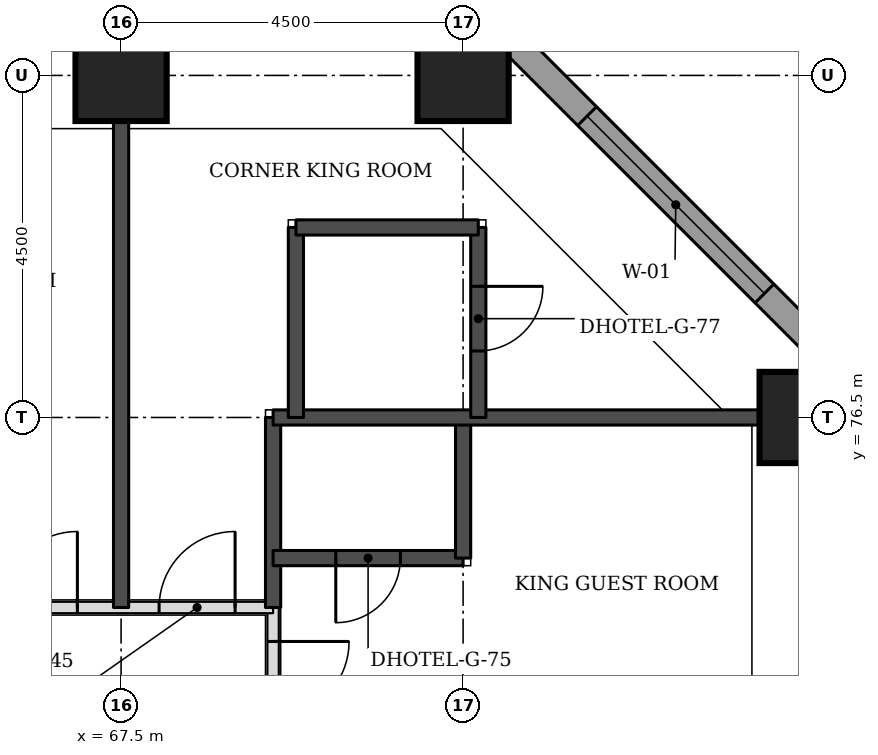
"""IFC4 building model, lengths in metres.
Left out: names, types, materials, properties, quantities, classifications, styles, units other than length and angle.
Written with IfcOpenShell. Run it as: python <this file> out.ifc"""

import sys

from ifc_helpers import new_model, si_unit, direction, frame, frame_2d, origin, origin_2d, place, context, subcontext, project, spatial, rectangle, extrude, element, fill, save


model = new_model("IFC4")
c1 = context("Model", 3, precision=1e-05, world=origin(), true_north=direction((0.0, 1.0)))
c2 = subcontext(c1, "Body", "Model", "MODEL_VIEW")
j1 = project(units=[si_unit("LENGTHUNIT", "METRE"), si_unit("PLANEANGLEUNIT", "RADIAN")], contexts=[c1])
p1 = place(None, origin())
s1 = spatial("IfcSite", under=j1, at=p1, CompositionType="ELEMENT")
p2 = place(p1, origin())
s2 = spatial("IfcBuilding", under=s1, at=p2, CompositionType="ELEMENT")
p3 = place(p2, frame((0.0, 0.0, 66.0)))
s3 = spatial("IfcBuildingStorey", under=s2, at=p3, CompositionType="ELEMENT", Elevation=66.0)
for number, where, z_axis, x_axis in (
    (1, (76.5, 76.5, 0.0), (0.0, 0.0, 1.0), (1.0, 0.0, 0.0)),
    (2, (67.5, 81.0, 0.0), (0.0, 0.0, 1.0), (1.0, 0.0, 0.0)),
    (3, (72.0, 81.0, 0.0), (0.0, 0.0, 1.0), (1.0, 0.0, 0.0)),
):
    element("IfcColumn", number, at=place(p3, frame(where, z_axis=z_axis, x_axis=x_axis)), inside=s3, PredefinedType="COLUMN", context=c2, shape_type="SweptSolid", body=[
        extrude(rectangle(XDim=1.2, YDim=1.2, at=origin_2d()), origin(), (0.0, 0.0, 1.0), 3.3),
    ])
p4 = place(p3, frame((77.326, 76.77, 0.0), z_axis=(0.0, 0.0, 1.0), x_axis=(-0.707106781187, 0.707106781187, 0.0)))
e4 = element("IfcWall", 4, at=p4, inside=s3, PredefinedType="STANDARD", context=c2, shape_type="SweptSolid", body=[
    extrude(rectangle(XDim=7.151, YDim=0.35, at=frame_2d((3.576, 0.0))), origin(), (0.0, 0.0, 1.0), 3.055),
])
p5 = place(p4, frame((1.926, 0.0, 0.8)))
e5 = element("IfcOpeningElement", 5, at=p5, cuts=e4, PredefinedType="OPENING", context=c2, shape_type="SweptSolid", body=[
    extrude(rectangle(XDim=3.3, YDim=1.5, at=frame_2d((1.65, 0.75))), frame((0.0, 0.185, 0.0), z_axis=(0.0, -1.0, 0.0), x_axis=(1.0, 0.0, 0.0)), (0.0, 0.0, 1.0), 0.37),
])
p6 = place(p3, frame((69.5, 47.5, 0.0), z_axis=(0.0, 0.0, 1.0), x_axis=(0.0, 1.0, 0.0)))
e6 = element("IfcWall", 6, at=p6, inside=s3, PredefinedType="PARTITIONING", context=c2, shape_type="SweptSolid", body=[
    extrude(rectangle(XDim=26.5, YDim=0.15, at=frame_2d((13.25, 0.0))), origin(), (0.0, 0.0, 1.0), 3.08),
])
p7 = place(p6, frame((25.053, 0.0, 0.0)))
e7 = element("IfcOpeningElement", 7, at=p7, cuts=e6, PredefinedType="OPENING", context=c2, shape_type="SweptSolid", body=[
    extrude(rectangle(XDim=1.0, YDim=2.1, at=frame_2d((0.5, 1.05))), frame((0.0, 0.085, 0.0), z_axis=(0.0, -1.0, 0.0), x_axis=(1.0, 0.0, 0.0)), (0.0, 0.0, 1.0), 0.17),
])
p8 = place(p6, frame((22.925, 0.0, 0.0)))
e8 = element("IfcOpeningElement", 8, at=p8, cuts=e6, PredefinedType="OPENING", context=c2, shape_type="SweptSolid", body=[
    extrude(rectangle(XDim=1.0, YDim=2.1, at=frame_2d((0.5, 1.05))), frame((0.0, 0.085, 0.0), z_axis=(0.0, -1.0, 0.0), x_axis=(1.0, 0.0, 0.0)), (0.0, 0.0, 1.0), 0.17),
])
p9 = place(p6, frame((16.325, 0.0, 0.0)))
e9 = element("IfcOpeningElement", 9, at=p9, cuts=e6, PredefinedType="OPENING", context=c2, shape_type="SweptSolid", body=[
    extrude(rectangle(XDim=1.0, YDim=2.1, at=frame_2d((0.5, 1.05))), frame((0.0, 0.085, 0.0), z_axis=(0.0, -1.0, 0.0), x_axis=(1.0, 0.0, 0.0)), (0.0, 0.0, 1.0), 0.17),
])
p10 = place(p6, frame((13.925, 0.0, 0.0)))
e10 = element("IfcOpeningElement", 10, at=p10, cuts=e6, PredefinedType="OPENING", context=c2, shape_type="SweptSolid", body=[
    extrude(rectangle(XDim=1.0, YDim=2.1, at=frame_2d((0.5, 1.05))), frame((0.0, 0.085, 0.0), z_axis=(0.0, -1.0, 0.0), x_axis=(1.0, 0.0, 0.0)), (0.0, 0.0, 1.0), 0.17),
])
p11 = place(p6, frame((4.25, 0.0, 0.0)))
e11 = element("IfcOpeningElement", 11, at=p11, cuts=e6, PredefinedType="OPENING", context=c2, shape_type="SweptSolid", body=[
    extrude(rectangle(XDim=1.1, YDim=2.1, at=frame_2d((0.55, 1.05))), frame((0.0, 0.085, 0.0), z_axis=(0.0, -1.0, 0.0), x_axis=(1.0, 0.0, 0.0)), (0.0, 0.0, 1.0), 0.17),
])
p12 = place(p6, frame((0.447, 0.0, 0.0)))
e12 = element("IfcOpeningElement", 12, at=p12, cuts=e6, PredefinedType="OPENING", context=c2, shape_type="SweptSolid", body=[
    extrude(rectangle(XDim=1.0, YDim=2.1, at=frame_2d((0.5, 1.05))), frame((0.0, 0.085, 0.0), z_axis=(0.0, -1.0, 0.0), x_axis=(1.0, 0.0, 0.0)), (0.0, 0.0, 1.0), 0.17),
])
p13 = place(p3, frame((43.0, 74.0, 0.0), z_axis=(0.0, 0.0, 1.0), x_axis=(1.0, 0.0, 0.0)))
e13 = element("IfcWall", 13, at=p13, inside=s3, PredefinedType="PARTITIONING", context=c2, shape_type="SweptSolid", body=[
    extrude(rectangle(XDim=26.5, YDim=0.15, at=frame_2d((13.25, 0.0))), origin(), (0.0, 0.0, 1.0), 3.08),
])
p14 = place(p13, frame((4.925, 0.0, 0.0)))
e14 = element("IfcOpeningElement", 14, at=p14, cuts=e13, PredefinedType="OPENING", context=c2, shape_type="SweptSolid", body=[
    extrude(rectangle(XDim=1.0, YDim=2.1, at=frame_2d((0.5, 1.05))), frame((0.0, 0.085, 0.0), z_axis=(0.0, -1.0, 0.0), x_axis=(1.0, 0.0, 0.0)), (0.0, 0.0, 1.0), 0.17),
])
p15 = place(p13, frame((7.325, 0.0, 0.0)))
e15 = element("IfcOpeningElement", 15, at=p15, cuts=e13, PredefinedType="OPENING", context=c2, shape_type="SweptSolid", body=[
    extrude(rectangle(XDim=1.0, YDim=2.1, at=frame_2d((0.5, 1.05))), frame((0.0, 0.085, 0.0), z_axis=(0.0, -1.0, 0.0), x_axis=(1.0, 0.0, 0.0)), (0.0, 0.0, 1.0), 0.17),
])
p16 = place(p13, frame((13.925, 0.0, 0.0)))
e16 = element("IfcOpeningElement", 16, at=p16, cuts=e13, PredefinedType="OPENING", context=c2, shape_type="SweptSolid", body=[
    extrude(rectangle(XDim=1.0, YDim=2.1, at=frame_2d((0.5, 1.05))), frame((0.0, 0.085, 0.0), z_axis=(0.0, -1.0, 0.0), x_axis=(1.0, 0.0, 0.0)), (0.0, 0.0, 1.0), 0.17),
])
p17 = place(p13, frame((16.325, 0.0, 0.0)))
e17 = element("IfcOpeningElement", 17, at=p17, cuts=e13, PredefinedType="OPENING", context=c2, shape_type="SweptSolid", body=[
    extrude(rectangle(XDim=1.0, YDim=2.1, at=frame_2d((0.5, 1.05))), frame((0.0, 0.085, 0.0), z_axis=(0.0, -1.0, 0.0), x_axis=(1.0, 0.0, 0.0)), (0.0, 0.0, 1.0), 0.17),
])
p18 = place(p13, frame((22.925, 0.0, 0.0)))
e18 = element("IfcOpeningElement", 18, at=p18, cuts=e13, PredefinedType="OPENING", context=c2, shape_type="SweptSolid", body=[
    extrude(rectangle(XDim=1.0, YDim=2.1, at=frame_2d((0.5, 1.05))), frame((0.0, 0.085, 0.0), z_axis=(0.0, -1.0, 0.0), x_axis=(1.0, 0.0, 0.0)), (0.0, 0.0, 1.0), 0.17),
])
p19 = place(p13, frame((0.5, 0.0, 0.0)))
e19 = element("IfcOpeningElement", 19, at=p19, cuts=e13, PredefinedType="OPENING", context=c2, shape_type="SweptSolid", body=[
    extrude(rectangle(XDim=1.0, YDim=2.1, at=frame_2d((0.5, 1.05))), frame((0.0, 0.085, 0.0), z_axis=(0.0, -1.0, 0.0), x_axis=(1.0, 0.0, 0.0)), (0.0, 0.0, 1.0), 0.17),
])
p20 = place(p13, frame((25.0, 0.0, 0.0)))
e20 = element("IfcOpeningElement", 20, at=p20, cuts=e13, PredefinedType="OPENING", context=c2, shape_type="SweptSolid", body=[
    extrude(rectangle(XDim=1.0, YDim=2.1, at=frame_2d((0.5, 1.05))), frame((0.0, 0.085, 0.0), z_axis=(0.0, -1.0, 0.0), x_axis=(1.0, 0.0, 0.0)), (0.0, 0.0, 1.0), 0.17),
])
p21 = place(p3, frame((67.5, 74.0, 0.0), z_axis=(0.0, 0.0, 1.0), x_axis=(0.0, 1.0, 0.0)))
e21 = element("IfcWall", 21, at=p21, inside=s3, PredefinedType="SOLIDWALL", context=c2, shape_type="SweptSolid", body=[
    extrude(rectangle(XDim=6.4, YDim=0.2, at=frame_2d((3.2, 0.0))), origin(), (0.0, 0.0, 1.0), 3.08),
])
p22 = place(p3, frame((69.5, 74.0, 0.0), z_axis=(0.0, 0.0, 1.0), x_axis=(0.0, 1.0, 0.0)))
e22 = element("IfcWall", 22, at=p22, inside=s3, PredefinedType="SOLIDWALL", context=c2, shape_type="SweptSolid", body=[
    extrude(rectangle(XDim=2.5, YDim=0.2, at=frame_2d((1.25, 0.0))), origin(), (0.0, 0.0, 1.0), 3.08),
])
p23 = place(p3, frame((69.5, 74.65, 0.0), z_axis=(0.0, 0.0, 1.0), x_axis=(1.0, 0.0, 0.0)))
e23 = element("IfcWall", 23, at=p23, inside=s3, PredefinedType="SOLIDWALL", context=c2, shape_type="SweptSolid", body=[
    extrude(rectangle(XDim=2.5, YDim=0.2, at=frame_2d((1.25, 0.0))), origin(), (0.0, 0.0, 1.0), 3.08),
])
p24 = place(p23, frame((0.825, 0.0, 0.0)))
e24 = element("IfcOpeningElement", 24, at=p24, cuts=e23, PredefinedType="OPENING", context=c2, shape_type="SweptSolid", body=[
    extrude(rectangle(XDim=0.85, YDim=2.1, at=frame_2d((0.425, 1.05))), frame((0.0, 0.11, 0.0), z_axis=(0.0, -1.0, 0.0), x_axis=(1.0, 0.0, 0.0)), (0.0, 0.0, 1.0), 0.22),
])
p25 = place(p3, frame((72.0, 74.65, 0.0), z_axis=(0.0, 0.0, 1.0), x_axis=(0.0, 1.0, 0.0)))
e25 = element("IfcWall", 25, at=p25, inside=s3, PredefinedType="SOLIDWALL", context=c2, shape_type="SweptSolid", body=[
    extrude(rectangle(XDim=1.85, YDim=0.2, at=frame_2d((0.925, 0.0))), origin(), (0.0, 0.0, 1.0), 3.08),
])
p26 = place(p3, frame((69.5, 76.5, 0.0), z_axis=(0.0, 0.0, 1.0), x_axis=(1.0, 0.0, 0.0)))
e26 = element("IfcWall", 26, at=p26, inside=s3, PredefinedType="SOLIDWALL", context=c2, shape_type="SweptSolid", body=[
    extrude(rectangle(XDim=6.4, YDim=0.2, at=frame_2d((3.2, 0.0))), origin(), (0.0, 0.0, 1.0), 3.08),
])
p27 = place(p3, frame((69.8, 76.5, 0.0), z_axis=(0.0, 0.0, 1.0), x_axis=(0.0, 1.0, 0.0)))
e27 = element("IfcWall", 27, at=p27, inside=s3, PredefinedType="SOLIDWALL", context=c2, shape_type="SweptSolid", body=[
    extrude(rectangle(XDim=2.5, YDim=0.2, at=frame_2d((1.25, 0.0))), origin(), (0.0, 0.0, 1.0), 3.08),
])
p28 = place(p3, frame((72.2, 76.5, 0.0), z_axis=(0.0, 0.0, 1.0), x_axis=(0.0, 1.0, 0.0)))
e28 = element("IfcWall", 28, at=p28, inside=s3, PredefinedType="SOLIDWALL", context=c2, shape_type="SweptSolid", body=[
    extrude(rectangle(XDim=2.5, YDim=0.2, at=frame_2d((1.25, 0.0))), origin(), (0.0, 0.0, 1.0), 3.08),
])
p29 = place(p28, frame((0.875, 0.0, 0.0)))
e29 = element("IfcOpeningElement", 29, at=p29, cuts=e28, PredefinedType="OPENING", context=c2, shape_type="SweptSolid", body=[
    extrude(rectangle(XDim=0.85, YDim=2.1, at=frame_2d((0.425, 1.05))), frame((0.0, 0.11, 0.0), z_axis=(0.0, -1.0, 0.0), x_axis=(1.0, 0.0, 0.0)), (0.0, 0.0, 1.0), 0.22),
])
p30 = place(p3, frame((69.8, 79.0, 0.0), z_axis=(0.0, 0.0, 1.0), x_axis=(1.0, 0.0, 0.0)))
e30 = element("IfcWall", 30, at=p30, inside=s3, PredefinedType="SOLIDWALL", context=c2, shape_type="SweptSolid", body=[
    extrude(rectangle(XDim=2.4, YDim=0.2, at=frame_2d((1.2, 0.0))), origin(), (0.0, 0.0, 1.0), 3.08),
])
p31 = place(p5, origin())
e31 = element("IfcWindow", 31, at=p31, inside=s3, PartitioningType="SINGLE_PANEL", PredefinedType="WINDOW", context=c2, shape_type="SweptSolid", body=[
    extrude(rectangle(XDim=3.3, YDim=1.5, at=frame_2d((1.65, 0.75))), frame((0.0, 0.085, 0.0), z_axis=(0.0, -1.0, 0.0), x_axis=(1.0, 0.0, 0.0)), (0.0, 0.0, 1.0), 0.06),
])
fill(e5, e31)
p32 = place(p18, origin())
e32 = element("IfcDoor", 32, at=p32, inside=s3, OperationType="SINGLE_SWING_RIGHT", PredefinedType="DOOR", context=c2, shape_type="SweptSolid", body=[
    extrude(rectangle(XDim=1.0, YDim=2.1, at=frame_2d((0.5, 1.05))), frame((0.0, 0.025, 0.0), z_axis=(0.0, -1.0, 0.0), x_axis=(1.0, 0.0, 0.0)), (0.0, 0.0, 1.0), 0.05),
])
fill(e18, e32)
p33 = place(p7, frame((1.0, 0.0, 0.0), z_axis=(0.0, 0.0, 1.0), x_axis=(-1.0, 0.0, 0.0)))
e33 = element("IfcDoor", 33, at=p33, inside=s3, OperationType="SINGLE_SWING_LEFT", PredefinedType="DOOR", context=c2, shape_type="SweptSolid", body=[
    extrude(rectangle(XDim=1.0, YDim=2.1, at=frame_2d((0.5, 1.05))), frame((0.0, 0.025, 0.0), z_axis=(0.0, -1.0, 0.0), x_axis=(1.0, 0.0, 0.0)), (0.0, 0.0, 1.0), 0.05),
])
fill(e7, e33)
p34 = place(p24, frame((0.85, 0.0, 0.0), z_axis=(0.0, 0.0, 1.0), x_axis=(-1.0, 0.0, 0.0)))
e34 = element("IfcDoor", 34, at=p34, inside=s3, OperationType="SINGLE_SWING_RIGHT", PredefinedType="DOOR", context=c2, shape_type="SweptSolid", body=[
    extrude(rectangle(XDim=0.85, YDim=2.1, at=frame_2d((0.425, 1.05))), frame((0.0, 0.025, 0.0), z_axis=(0.0, -1.0, 0.0), x_axis=(1.0, 0.0, 0.0)), (0.0, 0.0, 1.0), 0.05),
])
fill(e24, e34)
p35 = place(p20, origin())
e35 = element("IfcDoor", 35, at=p35, inside=s3, OperationType="SINGLE_SWING_RIGHT", PredefinedType="DOOR", context=c2, shape_type="SweptSolid", body=[
    extrude(rectangle(XDim=1.0, YDim=2.1, at=frame_2d((0.5, 1.05))), frame((0.0, 0.025, 0.0), z_axis=(0.0, -1.0, 0.0), x_axis=(1.0, 0.0, 0.0)), (0.0, 0.0, 1.0), 0.05),
])
fill(e20, e35)
p36 = place(p29, frame((0.85, 0.0, 0.0), z_axis=(0.0, 0.0, 1.0), x_axis=(-1.0, 0.0, 0.0)))
e36 = element("IfcDoor", 36, at=p36, inside=s3, OperationType="SINGLE_SWING_LEFT", PredefinedType="DOOR", context=c2, shape_type="SweptSolid", body=[
    extrude(rectangle(XDim=0.85, YDim=2.1, at=frame_2d((0.425, 1.05))), frame((0.0, 0.025, 0.0), z_axis=(0.0, -1.0, 0.0), x_axis=(1.0, 0.0, 0.0)), (0.0, 0.0, 1.0), 0.05),
])
fill(e29, e36)
save(model, sys.argv[1])
